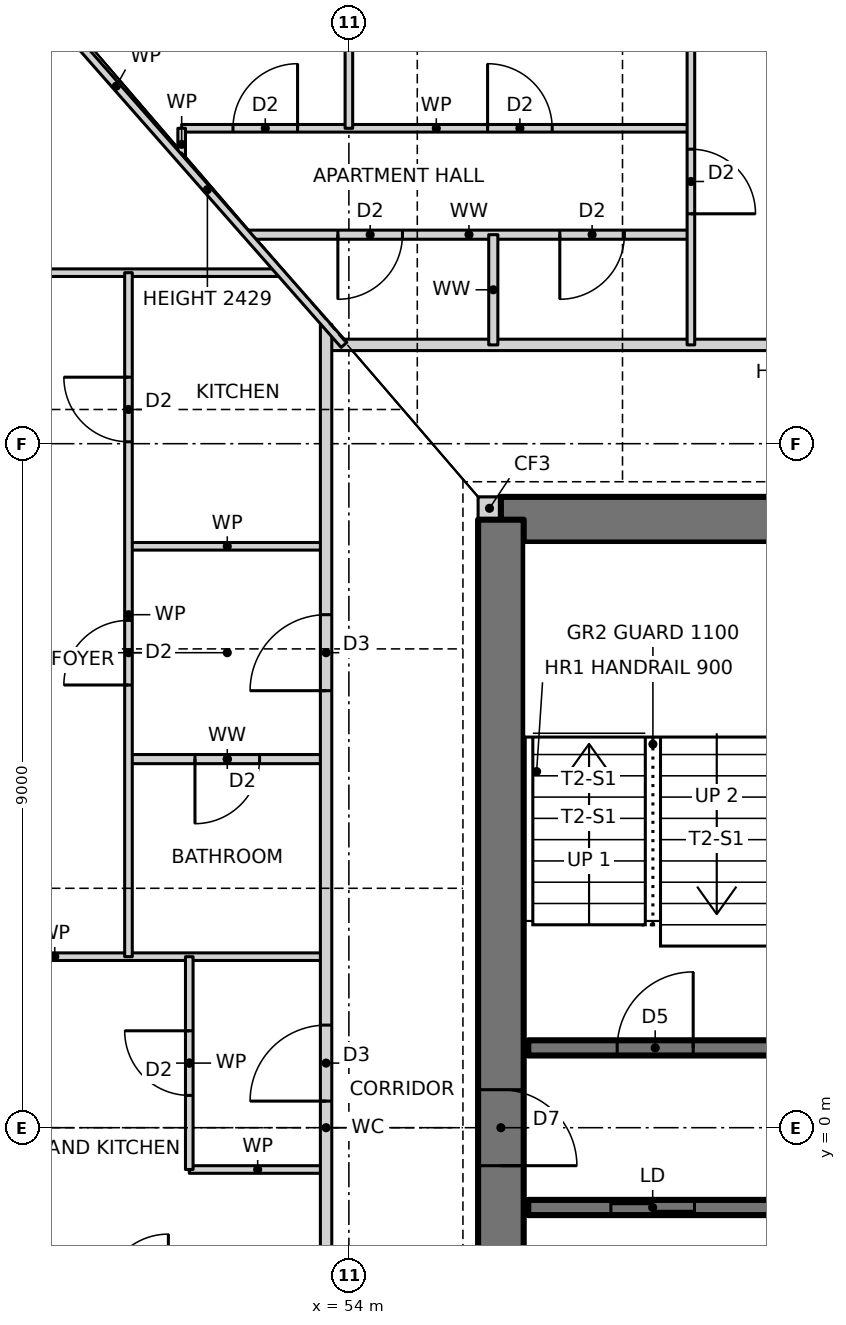
"""IFC4 building model, lengths in metres.
Left out: names, types, materials, properties, quantities, classifications, styles, units other than length and angle.
Written with IfcOpenShell. Run it as: python <this file> out.ifc"""

import sys

from ifc_helpers import new_model, si_unit, direction, frame, frame_2d, origin, place, context, subcontext, project, spatial, rectangle, extrude, element, fill, save


model = new_model("IFC4")
c1 = context("Model", 3, precision=1e-05, world=origin(), true_north=direction((0.0, 1.0)))
c2 = subcontext(c1, "Body", "Model", "MODEL_VIEW")
j1 = project(units=[si_unit("LENGTHUNIT", "METRE"), si_unit("PLANEANGLEUNIT", "RADIAN")], contexts=[c1])
p1 = place(None, origin())
s1 = spatial("IfcSite", under=j1, at=p1, CompositionType="ELEMENT")
p2 = place(p1, origin())
s2 = spatial("IfcBuilding", under=s1, at=p2, CompositionType="ELEMENT")
p3 = place(p2, frame((0.0, 0.0, 67.5)))
s3 = spatial("IfcBuildingStorey", under=s2, at=p3, CompositionType="ELEMENT", Elevation=67.5)
p4 = place(p3, frame((55.7, 8.15, 0.0), z_axis=(0.0, 0.0, 1.0), x_axis=(1.0, 0.0, 0.0)))
e1 = element("IfcWall", 1, at=p4, inside=s3, PredefinedType="SOLIDWALL", context=c2, shape_type="SweptSolid", body=[
    extrude(rectangle(XDim=0.3, YDim=0.3, at=frame_2d((0.15, 0.0))), origin(), (0.0, 0.0, 1.0), 3.5),
])
p5 = place(p3, frame((70.0, 8.0, 0.0), z_axis=(0.0, 0.0, 1.0), x_axis=(-1.0, 0.0, 0.0)))
e2 = element("IfcWall", 2, at=p5, inside=s3, PredefinedType="SHEAR", context=c2, shape_type="SweptSolid", body=[
    extrude(rectangle(XDim=14.0, YDim=0.6, at=frame_2d((7.0, 0.0))), origin(), (0.0, 0.0, 1.0), 3.5),
])
p6 = place(p5, frame((8.2, 0.0, 0.0)))
e3 = element("IfcOpeningElement", 3, at=p6, cuts=e2, PredefinedType="OPENING", context=c2, shape_type="SweptSolid", body=[
    extrude(rectangle(XDim=0.9, YDim=2.1, at=frame_2d((0.45, 1.05))), frame((0.0, 0.31, 0.0), z_axis=(0.0, -1.0, 0.0), x_axis=(1.0, 0.0, 0.0)), (0.0, 0.0, 1.0), 0.62),
])
p7 = place(p5, frame((3.2, 0.0, 0.0)))
e4 = element("IfcOpeningElement", 4, at=p7, cuts=e2, PredefinedType="OPENING", context=c2, shape_type="SweptSolid", body=[
    extrude(rectangle(XDim=0.9, YDim=2.1, at=frame_2d((0.45, 1.05))), frame((0.0, 0.31, 0.0), z_axis=(0.0, -1.0, 0.0), x_axis=(1.0, 0.0, 0.0)), (0.0, 0.0, 1.0), 0.62),
])
p8 = place(p3, frame((56.0, 8.0, 0.0), z_axis=(0.0, 0.0, 1.0), x_axis=(0.0, -1.0, 0.0)))
e5 = element("IfcWall", 5, at=p8, inside=s3, PredefinedType="SHEAR", context=c2, shape_type="SweptSolid", body=[
    extrude(rectangle(XDim=16.0, YDim=0.6, at=frame_2d((8.0, 0.0))), origin(), (0.0, 0.0, 1.0), 3.5),
])
p9 = place(p8, frame((7.5, 0.0, 0.0)))
e6 = element("IfcOpeningElement", 6, at=p9, cuts=e5, PredefinedType="OPENING", context=c2, shape_type="SweptSolid", body=[
    extrude(rectangle(XDim=1.0, YDim=2.1, at=frame_2d((0.5, 1.05))), frame((0.0, 0.31, 0.0), z_axis=(0.0, -1.0, 0.0), x_axis=(1.0, 0.0, 0.0)), (0.0, 0.0, 1.0), 0.62),
])
p10 = place(p3, frame((56.36, -1.05, 0.0), z_axis=(0.0, 0.0, 1.0), x_axis=(1.0, 0.0, 0.0)))
e7 = element("IfcWall", 7, at=p10, inside=s3, PredefinedType="SOLIDWALL", context=c2, shape_type="SweptSolid", body=[
    extrude(rectangle(XDim=13.28, YDim=0.2, at=frame_2d((6.64, 0.0))), origin(), (0.0, 0.0, 1.0), 3.5),
])
p11 = place(p10, frame((11.11, 0.0, 0.0)))
e8 = element("IfcOpeningElement", 8, at=p11, cuts=e7, PredefinedType="OPENING", context=c2, shape_type="SweptSolid", body=[
    extrude(rectangle(XDim=1.0, YDim=2.1, at=frame_2d((0.5, 1.05))), frame((0.0, 0.11, 0.0), z_axis=(0.0, -1.0, 0.0), x_axis=(1.0, 0.0, 0.0)), (0.0, 0.0, 1.0), 0.22),
])
p12 = place(p10, frame((1.087, 0.0, 0.0)))
e9 = element("IfcOpeningElement", 9, at=p12, cuts=e7, PredefinedType="OPENING", context=c2, shape_type="SweptSolid", body=[
    extrude(rectangle(XDim=1.1, YDim=2.1, at=frame_2d((0.55, 1.05))), frame((0.0, 0.11, 0.0), z_axis=(0.0, -1.0, 0.0), x_axis=(1.0, 0.0, 0.0)), (0.0, 0.0, 1.0), 0.22),
])
p13 = place(p10, frame((4.39, 0.0, 0.0)))
e10 = element("IfcOpeningElement", 10, at=p13, cuts=e7, PredefinedType="OPENING", context=c2, shape_type="SweptSolid", body=[
    extrude(rectangle(XDim=1.1, YDim=2.1, at=frame_2d((0.55, 1.05))), frame((0.0, 0.11, 0.0), z_axis=(0.0, -1.0, 0.0), x_axis=(1.0, 0.0, 0.0)), (0.0, 0.0, 1.0), 0.22),
])
p14 = place(p10, frame((7.724, 0.0, 0.0)))
e11 = element("IfcOpeningElement", 11, at=p14, cuts=e7, PredefinedType="OPENING", context=c2, shape_type="SweptSolid", body=[
    extrude(rectangle(XDim=1.1, YDim=2.1, at=frame_2d((0.55, 1.05))), frame((0.0, 0.11, 0.0), z_axis=(0.0, -1.0, 0.0), x_axis=(1.0, 0.0, 0.0)), (0.0, 0.0, 1.0), 0.22),
])
p15 = place(p3, frame((51.9, -0.55, 0.0), z_axis=(0.0, 0.0, 1.0), x_axis=(1.0, 0.0, 0.0)))
e12 = element("IfcWall", 12, at=p15, inside=s3, PredefinedType="PARTITIONING", context=c2, shape_type="SweptSolid", body=[
    extrude(rectangle(XDim=1.8, YDim=0.1, at=frame_2d((0.9, 0.0))), origin(), (0.0, 0.0, 1.0), 3.27),
])
p16 = place(p3, frame((56.36, 1.05, 0.0), z_axis=(0.0, 0.0, 1.0), x_axis=(1.0, 0.0, 0.0)))
e13 = element("IfcWall", 13, at=p16, inside=s3, PredefinedType="SOLIDWALL", context=c2, shape_type="SweptSolid", body=[
    extrude(rectangle(XDim=13.28, YDim=0.2, at=frame_2d((6.64, 0.0))), origin(), (0.0, 0.0, 1.0), 3.5),
])
p17 = place(p16, frame((1.17, 0.0, 0.0)))
e14 = element("IfcOpeningElement", 14, at=p17, cuts=e13, PredefinedType="OPENING", context=c2, shape_type="SweptSolid", body=[
    extrude(rectangle(XDim=1.0, YDim=2.1, at=frame_2d((0.5, 1.05))), frame((0.0, 0.11, 0.0), z_axis=(0.0, -1.0, 0.0), x_axis=(1.0, 0.0, 0.0)), (0.0, 0.0, 1.0), 0.22),
])
p18 = place(p16, frame((6.19, 0.0, 0.0)))
e15 = element("IfcOpeningElement", 15, at=p18, cuts=e13, PredefinedType="OPENING", context=c2, shape_type="SweptSolid", body=[
    extrude(rectangle(XDim=0.9, YDim=2.1, at=frame_2d((0.45, 1.05))), frame((0.0, 0.11, 0.0), z_axis=(0.0, -1.0, 0.0), x_axis=(1.0, 0.0, 0.0)), (0.0, 0.0, 1.0), 0.22),
])
p19 = place(p16, frame((10.96, 0.0, 0.0)))
e16 = element("IfcOpeningElement", 16, at=p19, cuts=e13, PredefinedType="OPENING", context=c2, shape_type="SweptSolid", body=[
    extrude(rectangle(XDim=1.3, YDim=2.1, at=frame_2d((0.65, 1.05))), frame((0.0, 0.11, 0.0), z_axis=(0.0, -1.0, 0.0), x_axis=(1.0, 0.0, 0.0)), (0.0, 0.0, 1.0), 0.22),
])
p20 = place(p3, frame((46.56, 2.25, 0.0), z_axis=(0.0, 0.0, 1.0), x_axis=(1.0, 0.0, 0.0)))
e17 = element("IfcWall", 17, at=p20, inside=s3, PredefinedType="PARTITIONING", context=c2, shape_type="SweptSolid", body=[
    extrude(rectangle(XDim=7.14, YDim=0.1, at=frame_2d((3.57, 0.0))), origin(), (0.0, 0.0, 1.0), 3.27),
])
p21 = place(p3, frame((51.1, 4.85, 0.0), z_axis=(0.0, 0.0, 1.0), x_axis=(1.0, 0.0, 0.0)))
e18 = element("IfcWall", 18, at=p21, inside=s3, PredefinedType="PARTITIONING", context=c2, shape_type="SweptSolid", body=[
    extrude(rectangle(XDim=2.6, YDim=0.12, at=frame_2d((1.3, 0.0))), origin(), (0.0, 0.0, 1.0), 3.27),
])
p22 = place(p21, frame((0.875, 0.0, 0.0)))
e19 = element("IfcOpeningElement", 19, at=p22, cuts=e18, PredefinedType="OPENING", context=c2, shape_type="SweptSolid", body=[
    extrude(rectangle(XDim=0.85, YDim=2.1, at=frame_2d((0.425, 1.05))), frame((0.0, 0.07, 0.0), z_axis=(0.0, -1.0, 0.0), x_axis=(1.0, 0.0, 0.0)), (0.0, 0.0, 1.0), 0.14),
])
p23 = place(p3, frame((51.1, 7.65, 0.0), z_axis=(0.0, 0.0, 1.0), x_axis=(1.0, 0.0, 0.0)))
e20 = element("IfcWall", 20, at=p23, inside=s3, PredefinedType="PARTITIONING", context=c2, shape_type="SweptSolid", body=[
    extrude(rectangle(XDim=2.6, YDim=0.1, at=frame_2d((1.3, 0.0))), origin(), (0.0, 0.0, 1.0), 3.27),
])
p24 = place(p3, frame((53.7, 10.3, 0.0), z_axis=(0.0, 0.0, 1.0), x_axis=(1.0, 0.0, 0.0)))
e21 = element("IfcWall", 21, at=p24, inside=s3, PredefinedType="PARTITIONING", context=c2, shape_type="SweptSolid", body=[
    extrude(rectangle(XDim=18.6, YDim=0.15, at=frame_2d((9.3, 0.0))), origin(), (0.0, 0.0, 1.0), 3.27),
])
p25 = place(p24, frame((12.8, 0.0, 0.0)))
e22 = element("IfcOpeningElement", 22, at=p25, cuts=e21, PredefinedType="OPENING", context=c2, shape_type="SweptSolid", body=[
    extrude(rectangle(XDim=1.0, YDim=2.1, at=frame_2d((0.5, 1.05))), frame((0.0, 0.085, 0.0), z_axis=(0.0, -1.0, 0.0), x_axis=(1.0, 0.0, 0.0)), (0.0, 0.0, 1.0), 0.17),
])
p26 = place(p24, frame((7.4, 0.0, 0.0)))
e23 = element("IfcOpeningElement", 23, at=p26, cuts=e21, PredefinedType="OPENING", context=c2, shape_type="SweptSolid", body=[
    extrude(rectangle(XDim=1.0, YDim=2.1, at=frame_2d((0.5, 1.05))), frame((0.0, 0.085, 0.0), z_axis=(0.0, -1.0, 0.0), x_axis=(1.0, 0.0, 0.0)), (0.0, 0.0, 1.0), 0.17),
])
p27 = place(p3, frame((46.56, 11.25, 0.0), z_axis=(0.0, 0.0, 1.0), x_axis=(1.0, 0.0, 0.0)))
e24 = element("IfcWall", 24, at=p27, inside=s3, PredefinedType="PARTITIONING", context=c2, shape_type="SweptSolid", body=[
    extrude(rectangle(XDim=6.54, YDim=0.1, at=frame_2d((3.27, 0.0))), origin(), (0.0, 0.0, 1.0), 3.27),
])
p28 = place(p27, frame((1.845, 0.0, 0.0)))
e25 = element("IfcOpeningElement", 25, at=p28, cuts=e24, PredefinedType="OPENING", context=c2, shape_type="SweptSolid", body=[
    extrude(rectangle(XDim=0.85, YDim=2.1, at=frame_2d((0.425, 1.05))), frame((0.0, 0.06, 0.0), z_axis=(0.0, -1.0, 0.0), x_axis=(1.0, 0.0, 0.0)), (0.0, 0.0, 1.0), 0.12),
])
p29 = place(p3, frame((52.66, 11.75, 0.0), z_axis=(0.0, 0.0, 1.0), x_axis=(1.0, 0.0, 0.0)))
e26 = element("IfcWall", 26, at=p29, inside=s3, PredefinedType="PARTITIONING", context=c2, shape_type="SweptSolid", body=[
    extrude(rectangle(XDim=5.84, YDim=0.12, at=frame_2d((2.92, 0.0))), origin(), (0.0, 0.0, 1.0), 3.27),
])
p30 = place(p29, frame((4.115, 0.0, 0.0)))
e27 = element("IfcOpeningElement", 27, at=p30, cuts=e26, PredefinedType="OPENING", context=c2, shape_type="SweptSolid", body=[
    extrude(rectangle(XDim=0.85, YDim=2.1, at=frame_2d((0.425, 1.05))), frame((0.0, 0.07, 0.0), z_axis=(0.0, -1.0, 0.0), x_axis=(1.0, 0.0, 0.0)), (0.0, 0.0, 1.0), 0.14),
])
p31 = place(p29, frame((1.195, 0.0, 0.0)))
e28 = element("IfcOpeningElement", 28, at=p31, cuts=e26, PredefinedType="OPENING", context=c2, shape_type="SweptSolid", body=[
    extrude(rectangle(XDim=0.85, YDim=2.1, at=frame_2d((0.425, 1.05))), frame((0.0, 0.07, 0.0), z_axis=(0.0, -1.0, 0.0), x_axis=(1.0, 0.0, 0.0)), (0.0, 0.0, 1.0), 0.14),
])
p32 = place(p3, frame((51.8, 13.15, 0.0), z_axis=(0.0, 0.0, 1.0), x_axis=(1.0, 0.0, 0.0)))
e29 = element("IfcWall", 29, at=p32, inside=s3, PredefinedType="PARTITIONING", context=c2, shape_type="SweptSolid", body=[
    extrude(rectangle(XDim=6.7, YDim=0.1, at=frame_2d((3.35, 0.0))), origin(), (0.0, 0.0, 1.0), 3.27),
])
p33 = place(p32, frame((4.025, 0.0, 0.0)))
e30 = element("IfcOpeningElement", 30, at=p33, cuts=e29, PredefinedType="OPENING", context=c2, shape_type="SweptSolid", body=[
    extrude(rectangle(XDim=0.85, YDim=2.1, at=frame_2d((0.425, 1.05))), frame((0.0, 0.06, 0.0), z_axis=(0.0, -1.0, 0.0), x_axis=(1.0, 0.0, 0.0)), (0.0, 0.0, 1.0), 0.12),
])
p34 = place(p32, frame((0.675, 0.0, 0.0)))
e31 = element("IfcOpeningElement", 31, at=p34, cuts=e29, PredefinedType="OPENING", context=c2, shape_type="SweptSolid", body=[
    extrude(rectangle(XDim=0.85, YDim=2.1, at=frame_2d((0.425, 1.05))), frame((0.0, 0.06, 0.0), z_axis=(0.0, -1.0, 0.0), x_axis=(1.0, 0.0, 0.0)), (0.0, 0.0, 1.0), 0.12),
])
p35 = place(p3, frame((58.5, 10.3, 0.0), z_axis=(0.0, 0.0, 1.0), x_axis=(0.0, 1.0, 0.0)))
e32 = element("IfcWall", 32, at=p35, inside=s3, PredefinedType="PARTITIONING", context=c2, shape_type="SweptSolid", body=[
    extrude(rectangle(XDim=8.39, YDim=0.1, at=frame_2d((4.195, 0.0))), origin(), (0.0, 0.0, 1.0), 3.27),
])
p36 = place(p35, frame((1.725, 0.0, 0.0)))
e33 = element("IfcOpeningElement", 33, at=p36, cuts=e32, PredefinedType="OPENING", context=c2, shape_type="SweptSolid", body=[
    extrude(rectangle(XDim=0.85, YDim=2.1, at=frame_2d((0.425, 1.05))), frame((0.0, 0.06, 0.0), z_axis=(0.0, -1.0, 0.0), x_axis=(1.0, 0.0, 0.0)), (0.0, 0.0, 1.0), 0.12),
])
p37 = place(p3, frame((55.9, 10.3, 0.0), z_axis=(0.0, 0.0, 1.0), x_axis=(0.0, 1.0, 0.0)))
e34 = element("IfcWall", 34, at=p37, inside=s3, PredefinedType="PARTITIONING", context=c2, shape_type="SweptSolid", body=[
    extrude(rectangle(XDim=1.45, YDim=0.12, at=frame_2d((0.725, 0.0))), origin(), (0.0, 0.0, 1.0), 3.27),
])
p38 = place(p3, frame((54.0, 13.15, 0.0), z_axis=(0.0, 0.0, 1.0), x_axis=(0.0, 1.0, 0.0)))
e35 = element("IfcWall", 35, at=p38, inside=s3, PredefinedType="PARTITIONING", context=c2, shape_type="SweptSolid", body=[
    extrude(rectangle(XDim=5.54, YDim=0.1, at=frame_2d((2.77, 0.0))), origin(), (0.0, 0.0, 1.0), 3.27),
])
p39 = place(p3, frame((53.7, -10.568, 0.0), z_axis=(0.0, 0.0, 1.0), x_axis=(0.0, 1.0, 0.0)))
e36 = element("IfcWall", 36, at=p39, inside=s3, PredefinedType="PARTITIONING", context=c2, shape_type="SweptSolid", body=[
    extrude(rectangle(XDim=21.136, YDim=0.15, at=frame_2d((10.568, 0.0))), origin(), (0.0, 0.0, 1.0), 3.27),
])
p40 = place(p39, frame((16.318, 0.0, 0.0)))
e37 = element("IfcOpeningElement", 37, at=p40, cuts=e36, PredefinedType="OPENING", context=c2, shape_type="SweptSolid", body=[
    extrude(rectangle(XDim=1.0, YDim=2.1, at=frame_2d((0.5, 1.05))), frame((0.0, 0.085, 0.0), z_axis=(0.0, -1.0, 0.0), x_axis=(1.0, 0.0, 0.0)), (0.0, 0.0, 1.0), 0.17),
])
p41 = place(p39, frame((10.918, 0.0, 0.0)))
e38 = element("IfcOpeningElement", 38, at=p41, cuts=e36, PredefinedType="OPENING", context=c2, shape_type="SweptSolid", body=[
    extrude(rectangle(XDim=1.0, YDim=2.1, at=frame_2d((0.5, 1.05))), frame((0.0, 0.085, 0.0), z_axis=(0.0, -1.0, 0.0), x_axis=(1.0, 0.0, 0.0)), (0.0, 0.0, 1.0), 0.17),
])
p42 = place(p3, frame((51.9, -0.55, 0.0), z_axis=(0.0, 0.0, 1.0), x_axis=(0.0, 1.0, 0.0)))
e39 = element("IfcWall", 39, at=p42, inside=s3, PredefinedType="PARTITIONING", context=c2, shape_type="SweptSolid", body=[
    extrude(rectangle(XDim=2.8, YDim=0.1, at=frame_2d((1.4, 0.0))), origin(), (0.0, 0.0, 1.0), 3.27),
])
p43 = place(p42, frame((0.975, 0.0, 0.0)))
e40 = element("IfcOpeningElement", 40, at=p43, cuts=e39, PredefinedType="OPENING", context=c2, shape_type="SweptSolid", body=[
    extrude(rectangle(XDim=0.85, YDim=2.1, at=frame_2d((0.425, 1.05))), frame((0.0, 0.06, 0.0), z_axis=(0.0, -1.0, 0.0), x_axis=(1.0, 0.0, 0.0)), (0.0, 0.0, 1.0), 0.12),
])
p44 = place(p3, frame((51.8, 12.727, 0.0), z_axis=(0.0, 0.0, 1.0), x_axis=(0.0, 1.0, 0.0)))
e41 = element("IfcWall", 41, at=p44, inside=s3, PredefinedType="PARTITIONING", context=c2, shape_type="SweptSolid", body=[
    extrude(rectangle(XDim=0.423, YDim=0.1, at=frame_2d((0.211, 0.0))), origin(), (0.0, 0.0, 1.0), 3.27),
])
p45 = place(p3, frame((51.1, 2.25, 0.0), z_axis=(0.0, 0.0, 1.0), x_axis=(0.0, 1.0, 0.0)))
e42 = element("IfcWall", 42, at=p45, inside=s3, PredefinedType="PARTITIONING", context=c2, shape_type="SweptSolid", body=[
    extrude(rectangle(XDim=9.0, YDim=0.1, at=frame_2d((4.5, 0.0))), origin(), (0.0, 0.0, 1.0), 3.27),
])
p46 = place(p45, frame((6.775, 0.0, 0.0)))
e43 = element("IfcOpeningElement", 43, at=p46, cuts=e42, PredefinedType="OPENING", context=c2, shape_type="SweptSolid", body=[
    extrude(rectangle(XDim=0.85, YDim=2.1, at=frame_2d((0.425, 1.05))), frame((0.0, 0.06, 0.0), z_axis=(0.0, -1.0, 0.0), x_axis=(1.0, 0.0, 0.0)), (0.0, 0.0, 1.0), 0.12),
])
p47 = place(p45, frame((3.575, 0.0, 0.0)))
e44 = element("IfcOpeningElement", 44, at=p47, cuts=e42, PredefinedType="OPENING", context=c2, shape_type="SweptSolid", body=[
    extrude(rectangle(XDim=0.85, YDim=2.1, at=frame_2d((0.425, 1.05))), frame((0.0, 0.06, 0.0), z_axis=(0.0, -1.0, 0.0), x_axis=(1.0, 0.0, 0.0)), (0.0, 0.0, 1.0), 0.12),
])
p48 = place(p3, frame((53.936, 10.3, 0.0), z_axis=(0.0, 0.0, 1.0), x_axis=(-0.660638210404, 0.750704439146, 0.0)))
e45 = element("IfcWall", 45, at=p48, inside=s3, PredefinedType="PARTITIONING", context=c2, shape_type="SweptSolid", body=[
    extrude(rectangle(XDim=9.07, YDim=0.1, at=frame_2d((4.535, 0.0))), origin(), (0.0, 0.0, 1.0), 2.429),
])
p49 = place(p17, origin())
e46 = element("IfcDoor", 46, at=p49, inside=s3, OperationType="SINGLE_SWING_RIGHT", PredefinedType="DOOR", context=c2, shape_type="SweptSolid", body=[
    extrude(rectangle(XDim=1.0, YDim=2.1, at=frame_2d((0.5, 1.05))), frame((0.0, 0.025, 0.0), z_axis=(0.0, -1.0, 0.0), x_axis=(1.0, 0.0, 0.0)), (0.0, 0.0, 1.0), 0.05),
])
fill(e14, e46)
p50 = place(p36, frame((0.85, 0.0, 0.0), z_axis=(0.0, 0.0, 1.0), x_axis=(-1.0, 0.0, 0.0)))
e47 = element("IfcDoor", 47, at=p50, inside=s3, OperationType="SINGLE_SWING_RIGHT", PredefinedType="DOOR", context=c2, shape_type="SweptSolid", body=[
    extrude(rectangle(XDim=0.85, YDim=2.1, at=frame_2d((0.425, 1.05))), frame((0.0, 0.025, 0.0), z_axis=(0.0, -1.0, 0.0), x_axis=(1.0, 0.0, 0.0)), (0.0, 0.0, 1.0), 0.05),
])
fill(e33, e47)
p51 = place(p33, origin())
e48 = element("IfcDoor", 48, at=p51, inside=s3, OperationType="SINGLE_SWING_LEFT", PredefinedType="DOOR", context=c2, shape_type="SweptSolid", body=[
    extrude(rectangle(XDim=0.85, YDim=2.1, at=frame_2d((0.425, 1.05))), frame((0.0, 0.025, 0.0), z_axis=(0.0, -1.0, 0.0), x_axis=(1.0, 0.0, 0.0)), (0.0, 0.0, 1.0), 0.05),
])
fill(e30, e48)
p52 = place(p34, origin())
e49 = element("IfcDoor", 49, at=p52, inside=s3, OperationType="SINGLE_SWING_RIGHT", PredefinedType="DOOR", context=c2, shape_type="SweptSolid", body=[
    extrude(rectangle(XDim=0.85, YDim=2.1, at=frame_2d((0.425, 1.05))), frame((0.0, 0.025, 0.0), z_axis=(0.0, -1.0, 0.0), x_axis=(1.0, 0.0, 0.0)), (0.0, 0.0, 1.0), 0.05),
])
fill(e31, e49)
p53 = place(p30, frame((0.85, 0.0, 0.0), z_axis=(0.0, 0.0, 1.0), x_axis=(-1.0, 0.0, 0.0)))
e50 = element("IfcDoor", 50, at=p53, inside=s3, OperationType="SINGLE_SWING_RIGHT", PredefinedType="DOOR", context=c2, shape_type="SweptSolid", body=[
    extrude(rectangle(XDim=0.85, YDim=2.1, at=frame_2d((0.425, 1.05))), frame((0.0, 0.025, 0.0), z_axis=(0.0, -1.0, 0.0), x_axis=(1.0, 0.0, 0.0)), (0.0, 0.0, 1.0), 0.05),
])
fill(e27, e50)
p54 = place(p31, frame((0.85, 0.0, 0.0), z_axis=(0.0, 0.0, 1.0), x_axis=(-1.0, 0.0, 0.0)))
e51 = element("IfcDoor", 51, at=p54, inside=s3, OperationType="SINGLE_SWING_RIGHT", PredefinedType="DOOR", context=c2, shape_type="SweptSolid", body=[
    extrude(rectangle(XDim=0.85, YDim=2.1, at=frame_2d((0.425, 1.05))), frame((0.0, 0.025, 0.0), z_axis=(0.0, -1.0, 0.0), x_axis=(1.0, 0.0, 0.0)), (0.0, 0.0, 1.0), 0.05),
])
fill(e28, e51)
p55 = place(p46, origin())
e52 = element("IfcDoor", 52, at=p55, inside=s3, OperationType="SINGLE_SWING_RIGHT", PredefinedType="DOOR", context=c2, shape_type="SweptSolid", body=[
    extrude(rectangle(XDim=0.85, YDim=2.1, at=frame_2d((0.425, 1.05))), frame((0.0, 0.025, 0.0), z_axis=(0.0, -1.0, 0.0), x_axis=(1.0, 0.0, 0.0)), (0.0, 0.0, 1.0), 0.05),
])
fill(e43, e52)
p56 = place(p40, origin())
e53 = element("IfcDoor", 53, at=p56, inside=s3, OperationType="SINGLE_SWING_LEFT", PredefinedType="DOOR", context=c2, shape_type="SweptSolid", body=[
    extrude(rectangle(XDim=1.0, YDim=2.1, at=frame_2d((0.5, 1.05))), frame((0.0, 0.025, 0.0), z_axis=(0.0, -1.0, 0.0), x_axis=(1.0, 0.0, 0.0)), (0.0, 0.0, 1.0), 0.05),
])
fill(e37, e53)
p57 = place(p47, origin())
e54 = element("IfcDoor", 54, at=p57, inside=s3, OperationType="SINGLE_SWING_LEFT", PredefinedType="DOOR", context=c2, shape_type="SweptSolid", body=[
    extrude(rectangle(XDim=0.85, YDim=2.1, at=frame_2d((0.425, 1.05))), frame((0.0, 0.025, 0.0), z_axis=(0.0, -1.0, 0.0), x_axis=(1.0, 0.0, 0.0)), (0.0, 0.0, 1.0), 0.05),
])
fill(e44, e54)
p58 = place(p22, frame((0.85, 0.0, 0.0), z_axis=(0.0, 0.0, 1.0), x_axis=(-1.0, 0.0, 0.0)))
e55 = element("IfcDoor", 55, at=p58, inside=s3, OperationType="SINGLE_SWING_RIGHT", PredefinedType="DOOR", context=c2, shape_type="SweptSolid", body=[
    extrude(rectangle(XDim=0.85, YDim=2.1, at=frame_2d((0.425, 1.05))), frame((0.0, 0.025, 0.0), z_axis=(0.0, -1.0, 0.0), x_axis=(1.0, 0.0, 0.0)), (0.0, 0.0, 1.0), 0.05),
])
fill(e19, e55)
p59 = place(p41, origin())
e56 = element("IfcDoor", 56, at=p59, inside=s3, OperationType="SINGLE_SWING_LEFT", PredefinedType="DOOR", context=c2, shape_type="SweptSolid", body=[
    extrude(rectangle(XDim=1.0, YDim=2.1, at=frame_2d((0.5, 1.05))), frame((0.0, 0.025, 0.0), z_axis=(0.0, -1.0, 0.0), x_axis=(1.0, 0.0, 0.0)), (0.0, 0.0, 1.0), 0.05),
])
fill(e38, e56)
p60 = place(p43, origin())
e57 = element("IfcDoor", 57, at=p60, inside=s3, OperationType="SINGLE_SWING_RIGHT", PredefinedType="DOOR", context=c2, shape_type="SweptSolid", body=[
    extrude(rectangle(XDim=0.85, YDim=2.1, at=frame_2d((0.425, 1.05))), frame((0.0, 0.025, 0.0), z_axis=(0.0, -1.0, 0.0), x_axis=(1.0, 0.0, 0.0)), (0.0, 0.0, 1.0), 0.05),
])
fill(e40, e57)
p61 = place(p9, origin())
e58 = element("IfcDoor", 58, at=p61, inside=s3, OperationType="SINGLE_SWING_RIGHT", PredefinedType="DOOR", context=c2, shape_type="SweptSolid", body=[
    extrude(rectangle(XDim=1.0, YDim=2.1, at=frame_2d((0.5, 1.05))), frame((0.0, 0.025, 0.0), z_axis=(0.0, -1.0, 0.0), x_axis=(1.0, 0.0, 0.0)), (0.0, 0.0, 1.0), 0.05),
])
fill(e6, e58)
p62 = place(p12, origin())
e59 = element("IfcDoor", 59, at=p62, inside=s3, OperationType="DOUBLE_DOOR_SLIDING", PredefinedType="DOOR", context=c2, shape_type="SweptSolid", body=[
    extrude(rectangle(XDim=1.1, YDim=2.1, at=frame_2d((0.55, 1.05))), frame((0.0, 0.025, 0.0), z_axis=(0.0, -1.0, 0.0), x_axis=(1.0, 0.0, 0.0)), (0.0, 0.0, 1.0), 0.05),
])
fill(e9, e59)
save(model, sys.argv[1])
